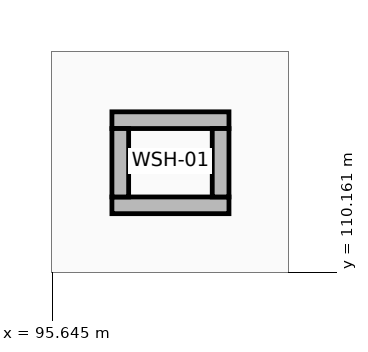
"""IFC4 building model, lengths in metres.
Left out: names, types, materials, properties, quantities, classifications, styles, units other than length and angle.
Written with IfcOpenShell. Run it as: python <this file> out.ifc"""

import sys

from ifc_helpers import new_model, si_unit, direction, frame, frame_2d, origin, place, context, subcontext, project, spatial, rectangle, extrude, element, save


model = new_model("IFC4")
c1 = context("Model", 3, precision=1e-05, world=origin(), true_north=direction((0.0, 1.0)))
c2 = subcontext(c1, "Body", "Model", "MODEL_VIEW")
j1 = project(units=[si_unit("LENGTHUNIT", "METRE"), si_unit("PLANEANGLEUNIT", "RADIAN")], contexts=[c1])
p1 = place(None, origin())
s1 = spatial("IfcSite", under=j1, at=p1, CompositionType="ELEMENT")
p2 = place(p1, origin())
s2 = spatial("IfcBuilding", under=s1, at=p2, CompositionType="ELEMENT")
p3 = place(p2, frame((0.0, 0.0, 43.8)))
s3 = spatial("IfcBuildingStorey", under=s2, at=p3, CompositionType="ELEMENT", Elevation=43.8)
for number, where, z_axis, x_axis in (
    (1, (96.43, 111.04, 0.0), (0.0, 0.0, 1.0), (1.0, 0.0, 0.0)),
    (2, (96.43, 112.16, 0.0), (0.0, 0.0, 1.0), (1.0, 0.0, 0.0)),
):
    element("IfcWall", number, at=place(p3, frame(where, z_axis=z_axis, x_axis=x_axis)), inside=s3, PredefinedType="STANDARD", context=c2, shape_type="SweptSolid", body=[
        extrude(rectangle(XDim=1.54, YDim=0.22, at=frame_2d((0.77, 0.0))), origin(), (0.0, 0.0, 1.0), 2.96),
    ])
for number, where, z_axis, x_axis in (
    (3, (96.54, 111.15, 0.0), (0.0, 0.0, 1.0), (0.0, 1.0, 0.0)),
    (4, (97.86, 111.15, 0.0), (0.0, 0.0, 1.0), (0.0, 1.0, 0.0)),
):
    element("IfcWall", number, at=place(p3, frame(where, z_axis=z_axis, x_axis=x_axis)), inside=s3, PredefinedType="STANDARD", context=c2, shape_type="SweptSolid", body=[
        extrude(rectangle(XDim=0.9, YDim=0.22, at=frame_2d((0.45, 0.0))), origin(), (0.0, 0.0, 1.0), 2.96),
    ])
save(model, sys.argv[1])
